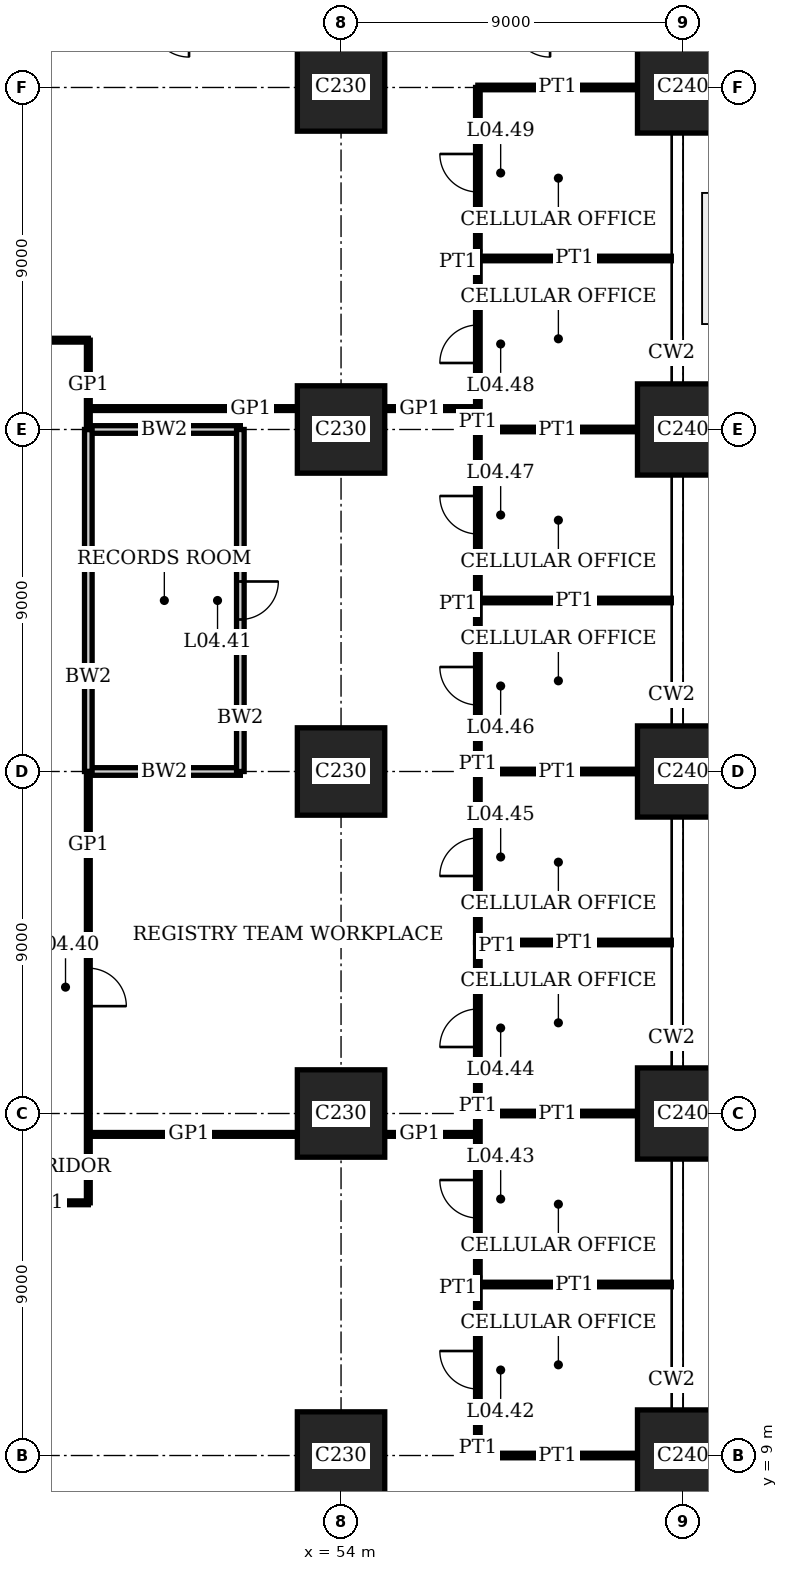
"""IFC4 building model, lengths in metres.
Left out: names, types, materials, properties, quantities, classifications, styles, units other than length and angle.
Written with IfcOpenShell. Run it as: python <this file> out.ifc"""

import sys

from ifc_helpers import new_model, si_unit, direction, frame, frame_2d, origin, origin_2d, place, context, subcontext, project, spatial, rectangle, extrude, element, fill, save


model = new_model("IFC4")
c1 = context("Model", 3, precision=1e-05, world=origin(), true_north=direction((0.0, 1.0)))
c2 = subcontext(c1, "Body", "Model", "MODEL_VIEW")
j1 = project(units=[si_unit("LENGTHUNIT", "METRE"), si_unit("PLANEANGLEUNIT", "RADIAN")], contexts=[c1])
p1 = place(None, origin())
s1 = spatial("IfcSite", under=j1, at=p1, CompositionType="ELEMENT")
p2 = place(p1, origin())
s2 = spatial("IfcBuilding", under=s1, at=p2, CompositionType="ELEMENT")
p3 = place(p2, frame((0.0, 0.0, 19.8)))
s3 = spatial("IfcBuildingStorey", under=s2, at=p3, CompositionType="ELEMENT", Elevation=19.8)
for number, where, z_axis, x_axis in (
    (1, (54.0, 9.0, 0.0), (0.0, 0.0, 1.0), (1.0, 0.0, 0.0)),
    (2, (54.0, 18.0, 0.0), (0.0, 0.0, 1.0), (1.0, 0.0, 0.0)),
    (3, (54.0, 27.0, 0.0), (0.0, 0.0, 1.0), (1.0, 0.0, 0.0)),
    (4, (54.0, 36.0, 0.0), (0.0, 0.0, 1.0), (1.0, 0.0, 0.0)),
    (5, (54.0, 45.0, 0.0), (0.0, 0.0, 1.0), (1.0, 0.0, 0.0)),
):
    element("IfcColumn", number, at=place(p3, frame(where, z_axis=z_axis, x_axis=x_axis)), inside=s3, PredefinedType="COLUMN", context=c2, shape_type="SweptSolid", body=[
        extrude(rectangle(XDim=2.3, YDim=2.3, at=origin_2d()), origin(), (0.0, 0.0, 1.0), 4.0),
    ])
for number, where, z_axis, x_axis in (
    (6, (63.0, 9.0, 0.0), (0.0, 0.0, 1.0), (1.0, 0.0, 0.0)),
    (7, (63.0, 18.0, 0.0), (0.0, 0.0, 1.0), (1.0, 0.0, 0.0)),
    (8, (63.0, 27.0, 0.0), (0.0, 0.0, 1.0), (1.0, 0.0, 0.0)),
    (9, (63.0, 36.0, 0.0), (0.0, 0.0, 1.0), (1.0, 0.0, 0.0)),
    (10, (63.0, 45.0, 0.0), (0.0, 0.0, 1.0), (1.0, 0.0, 0.0)),
):
    element("IfcColumn", number, at=place(p3, frame(where, z_axis=z_axis, x_axis=x_axis)), inside=s3, PredefinedType="COLUMN", context=c2, shape_type="SweptSolid", body=[
        extrude(rectangle(XDim=2.4, YDim=2.4, at=origin_2d()), origin(), (0.0, 0.0, 1.0), 4.0),
    ])
p4 = place(p3, frame((57.6, 9.0, 0.0), z_axis=(0.0, 0.0, 1.0), x_axis=(1.0, 0.0, 0.0)))
e11 = element("IfcWall", 11, at=p4, inside=s3, PredefinedType="PARTITIONING", context=c2, shape_type="SweptSolid", body=[
    extrude(rectangle(XDim=4.2, YDim=0.12, at=frame_2d((2.1, 0.0))), origin(), (0.0, 0.0, 1.0), 3.05),
])
p5 = place(p3, frame((57.6, 13.5, 0.0), z_axis=(0.0, 0.0, 1.0), x_axis=(1.0, 0.0, 0.0)))
e12 = element("IfcWall", 12, at=p5, inside=s3, PredefinedType="PARTITIONING", context=c2, shape_type="SweptSolid", body=[
    extrude(rectangle(XDim=5.09, YDim=0.12, at=frame_2d((2.545, 0.0))), origin(), (0.0, 0.0, 1.0), 3.1),
])
p6 = place(p3, frame((45.0, 15.65, 0.0), z_axis=(0.0, 0.0, 1.0), x_axis=(1.0, 0.0, 0.0)))
e13 = element("IfcWall", 13, at=p6, inside=s3, PredefinedType="PARTITIONING", context=c2, shape_type="SweptSolid", body=[
    extrude(rectangle(XDim=2.35, YDim=0.1, at=frame_2d((1.175, 0.0))), origin(), (0.0, 0.0, 1.0), 3.75),
])
p7 = place(p3, frame((47.35, 17.45, 0.0), z_axis=(0.0, 0.0, 1.0), x_axis=(1.0, 0.0, 0.0)))
e14 = element("IfcWall", 14, at=p7, inside=s3, PredefinedType="PARTITIONING", context=c2, shape_type="SweptSolid", body=[
    extrude(rectangle(XDim=5.5, YDim=0.1, at=frame_2d((2.75, 0.0))), origin(), (0.0, 0.0, 1.0), 3.75),
])
p8 = place(p3, frame((55.15, 17.45, 0.0), z_axis=(0.0, 0.0, 1.0), x_axis=(1.0, 0.0, 0.0)))
e15 = element("IfcWall", 15, at=p8, inside=s3, PredefinedType="PARTITIONING", context=c2, shape_type="SweptSolid", body=[
    extrude(rectangle(XDim=2.46, YDim=0.1, at=frame_2d((1.23, 0.0))), origin(), (0.0, 0.0, 1.0), 3.75),
])
p9 = place(p3, frame((57.6, 18.0, 0.0), z_axis=(0.0, 0.0, 1.0), x_axis=(1.0, 0.0, 0.0)))
e16 = element("IfcWall", 16, at=p9, inside=s3, PredefinedType="PARTITIONING", context=c2, shape_type="SweptSolid", body=[
    extrude(rectangle(XDim=4.2, YDim=0.12, at=frame_2d((2.1, 0.0))), origin(), (0.0, 0.0, 1.0), 3.05),
])
p10 = place(p3, frame((57.6, 22.5, 0.0), z_axis=(0.0, 0.0, 1.0), x_axis=(1.0, 0.0, 0.0)))
e17 = element("IfcWall", 17, at=p10, inside=s3, PredefinedType="PARTITIONING", context=c2, shape_type="SweptSolid", body=[
    extrude(rectangle(XDim=5.09, YDim=0.12, at=frame_2d((2.545, 0.0))), origin(), (0.0, 0.0, 1.0), 3.1),
])
p11 = place(p3, frame((47.35, 27.0, 0.0), z_axis=(0.0, 0.0, 1.0), x_axis=(1.0, 0.0, 0.0)))
e18 = element("IfcWall", 18, at=p11, inside=s3, PredefinedType="SOLIDWALL", context=c2, shape_type="SweptSolid", body=[
    extrude(rectangle(XDim=4.0, YDim=0.2, at=frame_2d((2.0, 0.0))), origin(), (0.0, 0.0, 1.0), 3.05),
])
p12 = place(p3, frame((57.6, 27.0, 0.0), z_axis=(0.0, 0.0, 1.0), x_axis=(1.0, 0.0, 0.0)))
e19 = element("IfcWall", 19, at=p12, inside=s3, PredefinedType="PARTITIONING", context=c2, shape_type="SweptSolid", body=[
    extrude(rectangle(XDim=4.2, YDim=0.12, at=frame_2d((2.1, 0.0))), origin(), (0.0, 0.0, 1.0), 3.05),
])
p13 = place(p3, frame((57.6, 31.5, 0.0), z_axis=(0.0, 0.0, 1.0), x_axis=(1.0, 0.0, 0.0)))
e20 = element("IfcWall", 20, at=p13, inside=s3, PredefinedType="PARTITIONING", context=c2, shape_type="SweptSolid", body=[
    extrude(rectangle(XDim=5.09, YDim=0.12, at=frame_2d((2.545, 0.0))), origin(), (0.0, 0.0, 1.0), 3.1),
])
p14 = place(p3, frame((47.35, 36.0, 0.0), z_axis=(0.0, 0.0, 1.0), x_axis=(1.0, 0.0, 0.0)))
e21 = element("IfcWall", 21, at=p14, inside=s3, PredefinedType="SOLIDWALL", context=c2, shape_type="SweptSolid", body=[
    extrude(rectangle(XDim=4.0, YDim=0.2, at=frame_2d((2.0, 0.0))), origin(), (0.0, 0.0, 1.0), 3.05),
])
p15 = place(p3, frame((57.6, 36.0, 0.0), z_axis=(0.0, 0.0, 1.0), x_axis=(1.0, 0.0, 0.0)))
e22 = element("IfcWall", 22, at=p15, inside=s3, PredefinedType="PARTITIONING", context=c2, shape_type="SweptSolid", body=[
    extrude(rectangle(XDim=4.2, YDim=0.12, at=frame_2d((2.1, 0.0))), origin(), (0.0, 0.0, 1.0), 3.05),
])
p16 = place(p3, frame((47.35, 36.55, 0.0), z_axis=(0.0, 0.0, 1.0), x_axis=(1.0, 0.0, 0.0)))
e23 = element("IfcWall", 23, at=p16, inside=s3, PredefinedType="PARTITIONING", context=c2, shape_type="SweptSolid", body=[
    extrude(rectangle(XDim=5.5, YDim=0.1, at=frame_2d((2.75, 0.0))), origin(), (0.0, 0.0, 1.0), 3.75),
])
p17 = place(p3, frame((55.15, 36.55, 0.0), z_axis=(0.0, 0.0, 1.0), x_axis=(1.0, 0.0, 0.0)))
e24 = element("IfcWall", 24, at=p17, inside=s3, PredefinedType="PARTITIONING", context=c2, shape_type="SweptSolid", body=[
    extrude(rectangle(XDim=2.46, YDim=0.1, at=frame_2d((1.23, 0.0))), origin(), (0.0, 0.0, 1.0), 3.75),
])
p18 = place(p3, frame((15.65, 38.35, 0.0), z_axis=(0.0, 0.0, 1.0), x_axis=(1.0, 0.0, 0.0)))
e25 = element("IfcWall", 25, at=p18, inside=s3, PredefinedType="PARTITIONING", context=c2, shape_type="SweptSolid", body=[
    extrude(rectangle(XDim=31.7, YDim=0.1, at=frame_2d((15.85, 0.0))), origin(), (0.0, 0.0, 1.0), 3.75),
])
p19 = place(p18, frame((15.35, 0.0, 0.0)))
e26 = element("IfcOpeningElement", 26, at=p19, cuts=e25, PredefinedType="OPENING", context=c2, shape_type="SweptSolid", body=[
    extrude(rectangle(XDim=1.0, YDim=2.4, at=frame_2d((0.5, 1.2))), frame((0.0, 0.06, 0.0), z_axis=(0.0, -1.0, 0.0), x_axis=(1.0, 0.0, 0.0)), (0.0, 0.0, 1.0), 0.12),
])
p20 = place(p3, frame((57.6, 40.5, 0.0), z_axis=(0.0, 0.0, 1.0), x_axis=(1.0, 0.0, 0.0)))
e27 = element("IfcWall", 27, at=p20, inside=s3, PredefinedType="PARTITIONING", context=c2, shape_type="SweptSolid", body=[
    extrude(rectangle(XDim=5.09, YDim=0.12, at=frame_2d((2.545, 0.0))), origin(), (0.0, 0.0, 1.0), 3.1),
])
p21 = place(p3, frame((57.6, 45.0, 0.0), z_axis=(0.0, 0.0, 1.0), x_axis=(1.0, 0.0, 0.0)))
e28 = element("IfcWall", 28, at=p21, inside=s3, PredefinedType="PARTITIONING", context=c2, shape_type="SweptSolid", body=[
    extrude(rectangle(XDim=4.2, YDim=0.12, at=frame_2d((2.1, 0.0))), origin(), (0.0, 0.0, 1.0), 3.05),
])
p22 = place(p3, frame((47.35, 27.0, 0.0), z_axis=(0.0, 0.0, 1.0), x_axis=(0.0, 1.0, 0.0)))
e29 = element("IfcWall", 29, at=p22, inside=s3, PredefinedType="SOLIDWALL", context=c2, shape_type="SweptSolid", body=[
    extrude(rectangle(XDim=9.0, YDim=0.2, at=frame_2d((4.5, 0.0))), origin(), (0.0, 0.0, 1.0), 3.75),
])
p23 = place(p3, frame((47.35, 15.65, 0.0), z_axis=(0.0, 0.0, 1.0), x_axis=(0.0, 1.0, 0.0)))
e30 = element("IfcWall", 30, at=p23, inside=s3, PredefinedType="PARTITIONING", context=c2, shape_type="SweptSolid", body=[
    extrude(rectangle(XDim=11.35, YDim=0.1, at=frame_2d((5.675, 0.0))), origin(), (0.0, 0.0, 1.0), 3.75),
])
p24 = place(p23, frame((5.175, 0.0, 0.0)))
e31 = element("IfcOpeningElement", 31, at=p24, cuts=e30, PredefinedType="OPENING", context=c2, shape_type="SweptSolid", body=[
    extrude(rectangle(XDim=1.0, YDim=2.4, at=frame_2d((0.5, 1.2))), frame((0.0, 0.06, 0.0), z_axis=(0.0, -1.0, 0.0), x_axis=(1.0, 0.0, 0.0)), (0.0, 0.0, 1.0), 0.12),
])
p25 = place(p3, frame((47.35, 36.0, 0.0), z_axis=(0.0, 0.0, 1.0), x_axis=(0.0, 1.0, 0.0)))
e32 = element("IfcWall", 32, at=p25, inside=s3, PredefinedType="PARTITIONING", context=c2, shape_type="SweptSolid", body=[
    extrude(rectangle(XDim=2.35, YDim=0.1, at=frame_2d((1.175, 0.0))), origin(), (0.0, 0.0, 1.0), 3.75),
])
p26 = place(p3, frame((51.35, 27.0, 0.0), z_axis=(0.0, 0.0, 1.0), x_axis=(0.0, 1.0, 0.0)))
e33 = element("IfcWall", 33, at=p26, inside=s3, PredefinedType="SOLIDWALL", context=c2, shape_type="SweptSolid", body=[
    extrude(rectangle(XDim=9.0, YDim=0.2, at=frame_2d((4.5, 0.0))), origin(), (0.0, 0.0, 1.0), 3.75),
])
p27 = place(p26, frame((4.0, 0.0, 0.0)))
e34 = element("IfcOpeningElement", 34, at=p27, cuts=e33, PredefinedType="OPENING", context=c2, shape_type="SweptSolid", body=[
    extrude(rectangle(XDim=1.0, YDim=2.4, at=frame_2d((0.5, 1.2))), frame((0.0, 0.11, 0.0), z_axis=(0.0, -1.0, 0.0), x_axis=(1.0, 0.0, 0.0)), (0.0, 0.0, 1.0), 0.22),
])
p28 = place(p3, frame((57.6, 9.0, 0.0), z_axis=(0.0, 0.0, 1.0), x_axis=(0.0, 1.0, 0.0)))
e35 = element("IfcWall", 35, at=p28, inside=s3, PredefinedType="PARTITIONING", context=c2, shape_type="SweptSolid", body=[
    extrude(rectangle(XDim=4.5, YDim=0.12, at=frame_2d((2.25, 0.0))), origin(), (0.0, 0.0, 1.0), 3.75),
])
p29 = place(p28, frame((1.75, 0.0, 0.0)))
e36 = element("IfcOpeningElement", 36, at=p29, cuts=e35, PredefinedType="OPENING", context=c2, shape_type="SweptSolid", body=[
    extrude(rectangle(XDim=1.0, YDim=2.4, at=frame_2d((0.5, 1.2))), frame((0.0, 0.07, 0.0), z_axis=(0.0, -1.0, 0.0), x_axis=(1.0, 0.0, 0.0)), (0.0, 0.0, 1.0), 0.14),
])
p30 = place(p3, frame((57.6, 13.5, 0.0), z_axis=(0.0, 0.0, 1.0), x_axis=(0.0, 1.0, 0.0)))
e37 = element("IfcWall", 37, at=p30, inside=s3, PredefinedType="PARTITIONING", context=c2, shape_type="SweptSolid", body=[
    extrude(rectangle(XDim=4.5, YDim=0.12, at=frame_2d((2.25, 0.0))), origin(), (0.0, 0.0, 1.0), 3.75),
])
p31 = place(p30, frame((1.75, 0.0, 0.0)))
e38 = element("IfcOpeningElement", 38, at=p31, cuts=e37, PredefinedType="OPENING", context=c2, shape_type="SweptSolid", body=[
    extrude(rectangle(XDim=1.0, YDim=2.4, at=frame_2d((0.5, 1.2))), frame((0.0, 0.07, 0.0), z_axis=(0.0, -1.0, 0.0), x_axis=(1.0, 0.0, 0.0)), (0.0, 0.0, 1.0), 0.14),
])
p32 = place(p3, frame((57.6, 18.0, 0.0), z_axis=(0.0, 0.0, 1.0), x_axis=(0.0, 1.0, 0.0)))
e39 = element("IfcWall", 39, at=p32, inside=s3, PredefinedType="PARTITIONING", context=c2, shape_type="SweptSolid", body=[
    extrude(rectangle(XDim=4.5, YDim=0.12, at=frame_2d((2.25, 0.0))), origin(), (0.0, 0.0, 1.0), 3.75),
])
p33 = place(p32, frame((1.75, 0.0, 0.0)))
e40 = element("IfcOpeningElement", 40, at=p33, cuts=e39, PredefinedType="OPENING", context=c2, shape_type="SweptSolid", body=[
    extrude(rectangle(XDim=1.0, YDim=2.4, at=frame_2d((0.5, 1.2))), frame((0.0, 0.07, 0.0), z_axis=(0.0, -1.0, 0.0), x_axis=(1.0, 0.0, 0.0)), (0.0, 0.0, 1.0), 0.14),
])
p34 = place(p3, frame((57.6, 22.5, 0.0), z_axis=(0.0, 0.0, 1.0), x_axis=(0.0, 1.0, 0.0)))
e41 = element("IfcWall", 41, at=p34, inside=s3, PredefinedType="PARTITIONING", context=c2, shape_type="SweptSolid", body=[
    extrude(rectangle(XDim=4.5, YDim=0.12, at=frame_2d((2.25, 0.0))), origin(), (0.0, 0.0, 1.0), 3.75),
])
p35 = place(p34, frame((1.75, 0.0, 0.0)))
e42 = element("IfcOpeningElement", 42, at=p35, cuts=e41, PredefinedType="OPENING", context=c2, shape_type="SweptSolid", body=[
    extrude(rectangle(XDim=1.0, YDim=2.4, at=frame_2d((0.5, 1.2))), frame((0.0, 0.07, 0.0), z_axis=(0.0, -1.0, 0.0), x_axis=(1.0, 0.0, 0.0)), (0.0, 0.0, 1.0), 0.14),
])
p36 = place(p3, frame((57.6, 27.0, 0.0), z_axis=(0.0, 0.0, 1.0), x_axis=(0.0, 1.0, 0.0)))
e43 = element("IfcWall", 43, at=p36, inside=s3, PredefinedType="PARTITIONING", context=c2, shape_type="SweptSolid", body=[
    extrude(rectangle(XDim=4.5, YDim=0.12, at=frame_2d((2.25, 0.0))), origin(), (0.0, 0.0, 1.0), 3.75),
])
p37 = place(p36, frame((1.75, 0.0, 0.0)))
e44 = element("IfcOpeningElement", 44, at=p37, cuts=e43, PredefinedType="OPENING", context=c2, shape_type="SweptSolid", body=[
    extrude(rectangle(XDim=1.0, YDim=2.4, at=frame_2d((0.5, 1.2))), frame((0.0, 0.07, 0.0), z_axis=(0.0, -1.0, 0.0), x_axis=(1.0, 0.0, 0.0)), (0.0, 0.0, 1.0), 0.14),
])
p38 = place(p3, frame((57.6, 31.5, 0.0), z_axis=(0.0, 0.0, 1.0), x_axis=(0.0, 1.0, 0.0)))
e45 = element("IfcWall", 45, at=p38, inside=s3, PredefinedType="PARTITIONING", context=c2, shape_type="SweptSolid", body=[
    extrude(rectangle(XDim=4.5, YDim=0.12, at=frame_2d((2.25, 0.0))), origin(), (0.0, 0.0, 1.0), 3.75),
])
p39 = place(p38, frame((1.75, 0.0, 0.0)))
e46 = element("IfcOpeningElement", 46, at=p39, cuts=e45, PredefinedType="OPENING", context=c2, shape_type="SweptSolid", body=[
    extrude(rectangle(XDim=1.0, YDim=2.4, at=frame_2d((0.5, 1.2))), frame((0.0, 0.07, 0.0), z_axis=(0.0, -1.0, 0.0), x_axis=(1.0, 0.0, 0.0)), (0.0, 0.0, 1.0), 0.14),
])
p40 = place(p3, frame((57.6, 36.0, 0.0), z_axis=(0.0, 0.0, 1.0), x_axis=(0.0, 1.0, 0.0)))
e47 = element("IfcWall", 47, at=p40, inside=s3, PredefinedType="PARTITIONING", context=c2, shape_type="SweptSolid", body=[
    extrude(rectangle(XDim=4.5, YDim=0.12, at=frame_2d((2.25, 0.0))), origin(), (0.0, 0.0, 1.0), 3.75),
])
p41 = place(p40, frame((1.75, 0.0, 0.0)))
e48 = element("IfcOpeningElement", 48, at=p41, cuts=e47, PredefinedType="OPENING", context=c2, shape_type="SweptSolid", body=[
    extrude(rectangle(XDim=1.0, YDim=2.4, at=frame_2d((0.5, 1.2))), frame((0.0, 0.07, 0.0), z_axis=(0.0, -1.0, 0.0), x_axis=(1.0, 0.0, 0.0)), (0.0, 0.0, 1.0), 0.14),
])
p42 = place(p3, frame((57.6, 40.5, 0.0), z_axis=(0.0, 0.0, 1.0), x_axis=(0.0, 1.0, 0.0)))
e49 = element("IfcWall", 49, at=p42, inside=s3, PredefinedType="PARTITIONING", context=c2, shape_type="SweptSolid", body=[
    extrude(rectangle(XDim=4.5, YDim=0.12, at=frame_2d((2.25, 0.0))), origin(), (0.0, 0.0, 1.0), 3.75),
])
p43 = place(p42, frame((1.75, 0.0, 0.0)))
e50 = element("IfcOpeningElement", 50, at=p43, cuts=e49, PredefinedType="OPENING", context=c2, shape_type="SweptSolid", body=[
    extrude(rectangle(XDim=1.0, YDim=2.4, at=frame_2d((0.5, 1.2))), frame((0.0, 0.07, 0.0), z_axis=(0.0, -1.0, 0.0), x_axis=(1.0, 0.0, 0.0)), (0.0, 0.0, 1.0), 0.14),
])
p44 = place(p24, origin())
e51 = element("IfcDoor", 51, at=p44, inside=s3, OperationType="SINGLE_SWING_LEFT", PredefinedType="DOOR", context=c2, shape_type="SweptSolid", body=[
    extrude(rectangle(XDim=1.0, YDim=2.4, at=frame_2d((0.5, 1.2))), frame((0.0, 0.02, 0.0), z_axis=(0.0, -1.0, 0.0), x_axis=(1.0, 0.0, 0.0)), (0.0, 0.0, 1.0), 0.04),
])
fill(e31, e51)
p45 = place(p27, origin())
e52 = element("IfcDoor", 52, at=p45, inside=s3, OperationType="SINGLE_SWING_RIGHT", PredefinedType="DOOR", context=c2, shape_type="SweptSolid", body=[
    extrude(rectangle(XDim=1.0, YDim=2.4, at=frame_2d((0.5, 1.2))), frame((0.0, 0.035, 0.0), z_axis=(0.0, -1.0, 0.0), x_axis=(1.0, 0.0, 0.0)), (0.0, 0.0, 1.0), 0.07),
])
fill(e34, e52)
p46 = place(p29, origin())
e53 = element("IfcDoor", 53, at=p46, inside=s3, OperationType="SINGLE_SWING_LEFT", PredefinedType="DOOR", context=c2, shape_type="SweptSolid", body=[
    extrude(rectangle(XDim=1.0, YDim=2.4, at=frame_2d((0.5, 1.2))), frame((0.0, 0.025, 0.0), z_axis=(0.0, -1.0, 0.0), x_axis=(1.0, 0.0, 0.0)), (0.0, 0.0, 1.0), 0.05),
])
fill(e36, e53)
p47 = place(p31, origin())
e54 = element("IfcDoor", 54, at=p47, inside=s3, OperationType="SINGLE_SWING_LEFT", PredefinedType="DOOR", context=c2, shape_type="SweptSolid", body=[
    extrude(rectangle(XDim=1.0, YDim=2.4, at=frame_2d((0.5, 1.2))), frame((0.0, 0.025, 0.0), z_axis=(0.0, -1.0, 0.0), x_axis=(1.0, 0.0, 0.0)), (0.0, 0.0, 1.0), 0.05),
])
fill(e38, e54)
p48 = place(p33, origin())
e55 = element("IfcDoor", 55, at=p48, inside=s3, OperationType="SINGLE_SWING_RIGHT", PredefinedType="DOOR", context=c2, shape_type="SweptSolid", body=[
    extrude(rectangle(XDim=1.0, YDim=2.4, at=frame_2d((0.5, 1.2))), frame((0.0, 0.025, 0.0), z_axis=(0.0, -1.0, 0.0), x_axis=(1.0, 0.0, 0.0)), (0.0, 0.0, 1.0), 0.05),
])
fill(e40, e55)
p49 = place(p35, origin())
e56 = element("IfcDoor", 56, at=p49, inside=s3, OperationType="SINGLE_SWING_RIGHT", PredefinedType="DOOR", context=c2, shape_type="SweptSolid", body=[
    extrude(rectangle(XDim=1.0, YDim=2.4, at=frame_2d((0.5, 1.2))), frame((0.0, 0.025, 0.0), z_axis=(0.0, -1.0, 0.0), x_axis=(1.0, 0.0, 0.0)), (0.0, 0.0, 1.0), 0.05),
])
fill(e42, e56)
p50 = place(p37, origin())
e57 = element("IfcDoor", 57, at=p50, inside=s3, OperationType="SINGLE_SWING_LEFT", PredefinedType="DOOR", context=c2, shape_type="SweptSolid", body=[
    extrude(rectangle(XDim=1.0, YDim=2.4, at=frame_2d((0.5, 1.2))), frame((0.0, 0.025, 0.0), z_axis=(0.0, -1.0, 0.0), x_axis=(1.0, 0.0, 0.0)), (0.0, 0.0, 1.0), 0.05),
])
fill(e44, e57)
p51 = place(p39, origin())
e58 = element("IfcDoor", 58, at=p51, inside=s3, OperationType="SINGLE_SWING_LEFT", PredefinedType="DOOR", context=c2, shape_type="SweptSolid", body=[
    extrude(rectangle(XDim=1.0, YDim=2.4, at=frame_2d((0.5, 1.2))), frame((0.0, 0.025, 0.0), z_axis=(0.0, -1.0, 0.0), x_axis=(1.0, 0.0, 0.0)), (0.0, 0.0, 1.0), 0.05),
])
fill(e46, e58)
p52 = place(p41, origin())
e59 = element("IfcDoor", 59, at=p52, inside=s3, OperationType="SINGLE_SWING_RIGHT", PredefinedType="DOOR", context=c2, shape_type="SweptSolid", body=[
    extrude(rectangle(XDim=1.0, YDim=2.4, at=frame_2d((0.5, 1.2))), frame((0.0, 0.025, 0.0), z_axis=(0.0, -1.0, 0.0), x_axis=(1.0, 0.0, 0.0)), (0.0, 0.0, 1.0), 0.05),
])
fill(e48, e59)
p53 = place(p43, origin())
e60 = element("IfcDoor", 60, at=p53, inside=s3, OperationType="SINGLE_SWING_LEFT", PredefinedType="DOOR", context=c2, shape_type="SweptSolid", body=[
    extrude(rectangle(XDim=1.0, YDim=2.4, at=frame_2d((0.5, 1.2))), frame((0.0, 0.025, 0.0), z_axis=(0.0, -1.0, 0.0), x_axis=(1.0, 0.0, 0.0)), (0.0, 0.0, 1.0), 0.05),
])
fill(e50, e60)
save(model, sys.argv[1])
